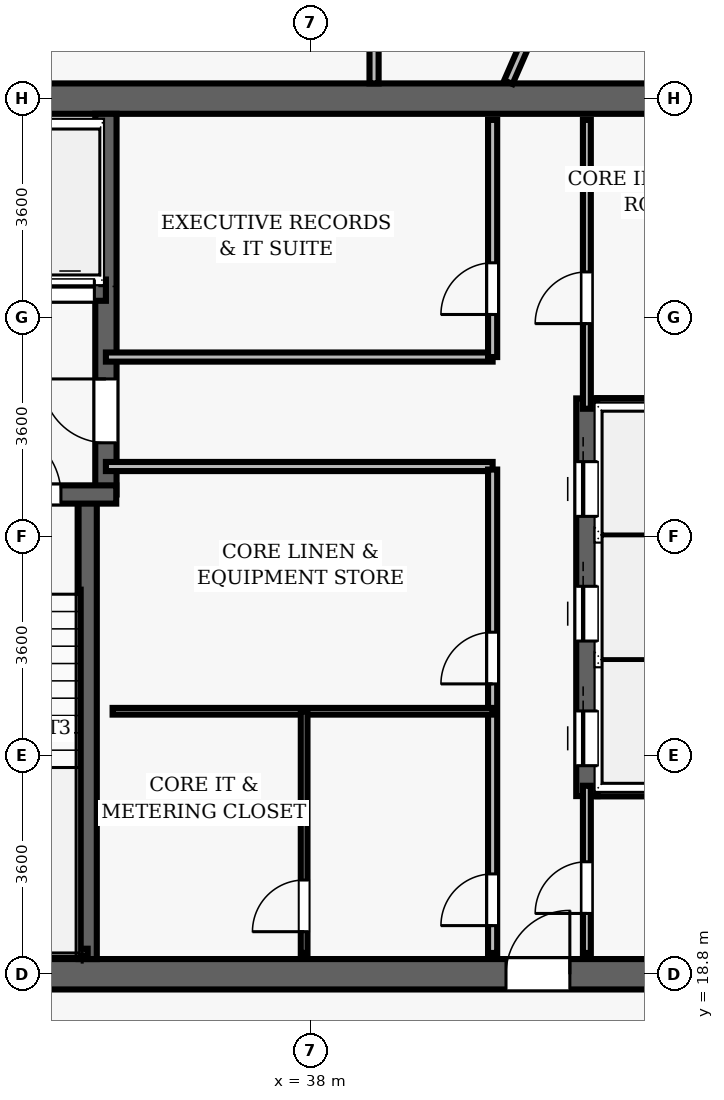
"""IFC4 building model, lengths in metres.
Left out: names, types, materials, properties, quantities, classifications, styles, units other than length and angle.
Written with IfcOpenShell. Run it as: python <this file> out.ifc"""

import sys

from ifc_helpers import new_model, si_unit, direction, frame, frame_2d, origin, place, context, subcontext, project, spatial, rectangle, extrude, element, fill, save


model = new_model("IFC4")
c1 = context("Model", 3, precision=1e-05, world=origin(), true_north=direction((0.0, 1.0)))
c2 = subcontext(c1, "Body", "Model", "MODEL_VIEW")
j1 = project(units=[si_unit("LENGTHUNIT", "METRE"), si_unit("PLANEANGLEUNIT", "RADIAN")], contexts=[c1])
p1 = place(None, origin())
s1 = spatial("IfcSite", under=j1, at=p1, CompositionType="ELEMENT")
p2 = place(p1, origin())
s2 = spatial("IfcBuilding", under=s1, at=p2, CompositionType="ELEMENT")
p3 = place(p2, frame((0.0, 0.0, 265.15)))
s3 = spatial("IfcBuildingStorey", under=s2, at=p3, CompositionType="ELEMENT", Elevation=265.15)
p4 = place(p3, frame((26.75, 18.8, 0.0), z_axis=(0.0, 0.0, 1.0), x_axis=(1.0, 0.0, 0.0)))
e1 = element("IfcWall", 1, at=p4, inside=s3, PredefinedType="SHEAR", context=c2, shape_type="SweptSolid", body=[
    extrude(rectangle(XDim=22.5, YDim=0.5, at=frame_2d((11.25, 0.0))), origin(), (0.0, 0.0, 1.0), 3.85),
])
p5 = place(p4, frame((14.47, 0.0, 0.0)))
e2 = element("IfcOpeningElement", 2, at=p5, cuts=e1, PredefinedType="OPENING", context=c2, shape_type="SweptSolid", body=[
    extrude(rectangle(XDim=1.05, YDim=2.15, at=frame_2d((0.525, 1.075))), frame((0.0, 0.26, 0.0), z_axis=(0.0, -1.0, 0.0), x_axis=(1.0, 0.0, 0.0)), (0.0, 0.0, 1.0), 0.52),
])
p6 = place(p3, frame((26.75, 33.2, 0.0), z_axis=(0.0, 0.0, 1.0), x_axis=(1.0, 0.0, 0.0)))
e3 = element("IfcWall", 3, at=p6, inside=s3, PredefinedType="SHEAR", context=c2, shape_type="SweptSolid", body=[
    extrude(rectangle(XDim=22.5, YDim=0.5, at=frame_2d((11.25, 0.0))), origin(), (0.0, 0.0, 1.0), 3.85),
])
p7 = place(p3, frame((34.34, 19.05, 0.0), z_axis=(0.0, 0.0, 1.0), x_axis=(0.0, 1.0, 0.0)))
e4 = element("IfcWall", 4, at=p7, inside=s3, PredefinedType="SHEAR", context=c2, shape_type="SweptSolid", body=[
    extrude(rectangle(XDim=7.5, YDim=0.3, at=frame_2d((3.75, 0.0))), origin(), (0.0, 0.0, 1.0), 3.85),
])
p8 = place(p3, frame((34.64, 26.69, 0.0), z_axis=(0.0, 0.0, 1.0), x_axis=(0.0, 1.0, 0.0)))
e5 = element("IfcWall", 5, at=p8, inside=s3, PredefinedType="SHEAR", context=c2, shape_type="SweptSolid", body=[
    extrude(rectangle(XDim=6.26, YDim=0.35, at=frame_2d((3.13, 0.0))), origin(), (0.0, 0.0, 1.0), 3.85),
])
p9 = place(p8, frame((0.85, 0.0, 0.0)))
e6 = element("IfcOpeningElement", 6, at=p9, cuts=e5, PredefinedType="OPENING", context=c2, shape_type="SweptSolid", body=[
    extrude(rectangle(XDim=1.05, YDim=2.15, at=frame_2d((0.525, 1.075))), frame((0.0, 0.185, 0.0), z_axis=(0.0, -1.0, 0.0), x_axis=(1.0, 0.0, 0.0)), (0.0, 0.0, 1.0), 0.37),
])
p10 = place(p3, frame((31.25, 26.69, 0.0), z_axis=(0.0, 0.0, 1.0), x_axis=(1.0, 0.0, 0.0)))
e7 = element("IfcWall", 7, at=p10, inside=s3, PredefinedType="SHEAR", context=c2, shape_type="SweptSolid", body=[
    extrude(rectangle(XDim=3.56, YDim=0.3, at=frame_2d((1.78, 0.0))), origin(), (0.0, 0.0, 1.0), 3.85),
])
p11 = place(p10, frame((1.55, 0.0, 0.0)))
e8 = element("IfcOpeningElement", 8, at=p11, cuts=e7, PredefinedType="OPENING", context=c2, shape_type="SweptSolid", body=[
    extrude(rectangle(XDim=1.1, YDim=2.15, at=frame_2d((0.55, 1.075))), frame((0.0, 0.16, 0.0), z_axis=(0.0, -1.0, 0.0), x_axis=(1.0, 0.0, 0.0)), (0.0, 0.0, 1.0), 0.32),
])
p12 = place(p3, frame((31.3, 19.16, 0.0), z_axis=(0.0, 0.0, 1.0), x_axis=(1.0, 0.0, 0.0)))
e9 = element("IfcWall", 9, at=p12, inside=s3, PredefinedType="SHEAR", context=c2, shape_type="SweptSolid", body=[
    extrude(rectangle(XDim=3.04, YDim=0.12, at=frame_2d((1.52, 0.0))), origin(), (0.0, 0.0, 1.0), 3.85),
])
p13 = place(p3, frame((32.23, 30.05, 0.0), z_axis=(0.0, 0.0, 1.0), x_axis=(1.0, 0.0, 0.0)))
e10 = element("IfcWall", 10, at=p13, inside=s3, PredefinedType="SHEAR", context=c2, shape_type="SweptSolid", body=[
    extrude(rectangle(XDim=2.41, YDim=0.35, at=frame_2d((1.205, 0.0))), origin(), (0.0, 0.0, 1.0), 3.04),
])
p14 = place(p13, frame((0.42, 0.0, 0.0)))
e11 = element("IfcOpeningElement", 11, at=p14, cuts=e10, PredefinedType="OPENING", context=c2, shape_type="SweptSolid", body=[
    extrude(rectangle(XDim=0.8, YDim=2.15, at=frame_2d((0.4, 1.075))), frame((0.0, 0.185, 0.0), z_axis=(0.0, -1.0, 0.0), x_axis=(1.0, 0.0, 0.0)), (0.0, 0.0, 1.0), 0.37),
])
p15 = place(p13, frame((1.42, 0.0, 0.0)))
e12 = element("IfcOpeningElement", 12, at=p15, cuts=e10, PredefinedType="OPENING", context=c2, shape_type="SweptSolid", body=[
    extrude(rectangle(XDim=0.8, YDim=2.15, at=frame_2d((0.4, 1.075))), frame((0.0, 0.185, 0.0), z_axis=(0.0, -1.0, 0.0), x_axis=(1.0, 0.0, 0.0)), (0.0, 0.0, 1.0), 0.37),
])
p16 = place(p3, frame((42.55, 21.73, 0.0), z_axis=(0.0, 0.0, 1.0), x_axis=(0.0, 1.0, 0.0)))
e13 = element("IfcWall", 13, at=p16, inside=s3, PredefinedType="SHEAR", context=c2, shape_type="SweptSolid", body=[
    extrude(rectangle(XDim=6.54, YDim=0.35, at=frame_2d((3.27, 0.0))), origin(), (0.0, 0.0, 1.0), 3.04),
])
p17 = place(p16, frame((0.5, 0.0, 0.0)))
e14 = element("IfcOpeningElement", 14, at=p17, cuts=e13, PredefinedType="OPENING", context=c2, shape_type="SweptSolid", body=[
    extrude(rectangle(XDim=0.9, YDim=2.15, at=frame_2d((0.45, 1.075))), frame((0.0, 0.185, 0.0), z_axis=(0.0, -1.0, 0.0), x_axis=(1.0, 0.0, 0.0)), (0.0, 0.0, 1.0), 0.37),
])
p18 = place(p16, frame((2.55, 0.0, 0.0)))
e15 = element("IfcOpeningElement", 15, at=p18, cuts=e13, PredefinedType="OPENING", context=c2, shape_type="SweptSolid", body=[
    extrude(rectangle(XDim=0.9, YDim=2.15, at=frame_2d((0.45, 1.075))), frame((0.0, 0.185, 0.0), z_axis=(0.0, -1.0, 0.0), x_axis=(1.0, 0.0, 0.0)), (0.0, 0.0, 1.0), 0.37),
])
p19 = place(p16, frame((4.6, 0.0, 0.0)))
e16 = element("IfcOpeningElement", 16, at=p19, cuts=e13, PredefinedType="OPENING", context=c2, shape_type="SweptSolid", body=[
    extrude(rectangle(XDim=0.9, YDim=2.15, at=frame_2d((0.45, 1.075))), frame((0.0, 0.185, 0.0), z_axis=(0.0, -1.0, 0.0), x_axis=(1.0, 0.0, 0.0)), (0.0, 0.0, 1.0), 0.37),
])
for number, where, z_axis, x_axis in (
    (17, (42.72, 21.9, 0.0), (0.0, 0.0, 1.0), (1.0, 0.0, 0.0)),
    (18, (42.72, 28.1, 0.0), (0.0, 0.0, 1.0), (1.0, 0.0, 0.0)),
):
    element("IfcWall", number, at=place(p3, frame(where, z_axis=z_axis, x_axis=x_axis)), inside=s3, PredefinedType="SHEAR", context=c2, shape_type="SweptSolid", body=[
        extrude(rectangle(XDim=2.03, YDim=0.35, at=frame_2d((1.015, 0.0))), origin(), (0.0, 0.0, 1.0), 3.04),
    ])
for number, where, z_axis, x_axis in (
    (19, (34.64, 27.15, 0.0), (0.0, 0.0, 1.0), (1.0, 0.0, 0.0)),
    (20, (34.64, 28.95, 0.0), (0.0, 0.0, 1.0), (1.0, 0.0, 0.0)),
):
    element("IfcWall", number, at=place(p3, frame(where, z_axis=z_axis, x_axis=x_axis)), inside=s3, PredefinedType="PARTITIONING", context=c2, shape_type="SweptSolid", body=[
        extrude(rectangle(XDim=6.36, YDim=0.15, at=frame_2d((3.18, 0.0))), origin(), (0.0, 0.0, 1.0), 3.04),
    ])
p20 = place(p3, frame((41.0, 28.95, 0.0), z_axis=(0.0, 0.0, 1.0), x_axis=(0.0, 1.0, 0.0)))
e21 = element("IfcWall", 21, at=p20, inside=s3, PredefinedType="PARTITIONING", context=c2, shape_type="SweptSolid", body=[
    extrude(rectangle(XDim=3.9, YDim=0.15, at=frame_2d((1.95, 0.0))), origin(), (0.0, 0.0, 1.0), 3.04),
])
p21 = place(p20, frame((0.7, 0.0, 0.0)))
e22 = element("IfcOpeningElement", 22, at=p21, cuts=e21, PredefinedType="OPENING", context=c2, shape_type="SweptSolid", body=[
    extrude(rectangle(XDim=0.85, YDim=2.1, at=frame_2d((0.425, 1.05))), frame((0.0, 0.085, 0.0), z_axis=(0.0, -1.0, 0.0), x_axis=(1.0, 0.0, 0.0)), (0.0, 0.0, 1.0), 0.17),
])
p22 = place(p3, frame((41.0, 19.15, 0.0), z_axis=(0.0, 0.0, 1.0), x_axis=(0.0, 1.0, 0.0)))
e23 = element("IfcWall", 23, at=p22, inside=s3, PredefinedType="PARTITIONING", context=c2, shape_type="SweptSolid", body=[
    extrude(rectangle(XDim=7.95, YDim=0.15, at=frame_2d((3.975, 0.0))), origin(), (0.0, 0.0, 1.0), 3.04),
])
p23 = place(p22, frame((4.425, 0.0, 0.0)))
e24 = element("IfcOpeningElement", 24, at=p23, cuts=e23, PredefinedType="OPENING", context=c2, shape_type="SweptSolid", body=[
    extrude(rectangle(XDim=0.85, YDim=2.1, at=frame_2d((0.425, 1.05))), frame((0.0, 0.085, 0.0), z_axis=(0.0, -1.0, 0.0), x_axis=(1.0, 0.0, 0.0)), (0.0, 0.0, 1.0), 0.17),
])
p24 = place(p22, frame((0.45, 0.0, 0.0)))
e25 = element("IfcOpeningElement", 25, at=p24, cuts=e23, PredefinedType="OPENING", context=c2, shape_type="SweptSolid", body=[
    extrude(rectangle(XDim=0.85, YDim=2.1, at=frame_2d((0.425, 1.05))), frame((0.0, 0.085, 0.0), z_axis=(0.0, -1.0, 0.0), x_axis=(1.0, 0.0, 0.0)), (0.0, 0.0, 1.0), 0.17),
])
p25 = place(p3, frame((34.75, 23.125, 0.0), z_axis=(0.0, 0.0, 1.0), x_axis=(1.0, 0.0, 0.0)))
e26 = element("IfcWall", 26, at=p25, inside=s3, PredefinedType="PARTITIONING", context=c2, shape_type="SweptSolid", body=[
    extrude(rectangle(XDim=6.25, YDim=0.11, at=frame_2d((3.125, 0.0))), origin(), (0.0, 0.0, 1.0), 3.04),
])
p26 = place(p3, frame((37.9, 19.15, 0.0), z_axis=(0.0, 0.0, 1.0), x_axis=(0.0, 1.0, 0.0)))
e27 = element("IfcWall", 27, at=p26, inside=s3, PredefinedType="PARTITIONING", context=c2, shape_type="SweptSolid", body=[
    extrude(rectangle(XDim=3.975, YDim=0.11, at=frame_2d((1.988, 0.0))), origin(), (0.0, 0.0, 1.0), 3.04),
])
p27 = place(p26, frame((0.35, 0.0, 0.0)))
e28 = element("IfcOpeningElement", 28, at=p27, cuts=e27, PredefinedType="OPENING", context=c2, shape_type="SweptSolid", body=[
    extrude(rectangle(XDim=0.85, YDim=2.1, at=frame_2d((0.425, 1.05))), frame((0.0, 0.065, 0.0), z_axis=(0.0, -1.0, 0.0), x_axis=(1.0, 0.0, 0.0)), (0.0, 0.0, 1.0), 0.13),
])
p28 = place(p3, frame((42.55, 28.1, 0.0), z_axis=(0.0, 0.0, 1.0), x_axis=(0.0, 1.0, 0.0)))
e29 = element("IfcWall", 29, at=p28, inside=s3, PredefinedType="PARTITIONING", context=c2, shape_type="SweptSolid", body=[
    extrude(rectangle(XDim=4.75, YDim=0.13, at=frame_2d((2.375, 0.0))), origin(), (0.0, 0.0, 1.0), 3.04),
])
p29 = place(p28, frame((1.4, 0.0, 0.0)))
e30 = element("IfcOpeningElement", 30, at=p29, cuts=e29, PredefinedType="OPENING", context=c2, shape_type="SweptSolid", body=[
    extrude(rectangle(XDim=0.85, YDim=2.1, at=frame_2d((0.425, 1.05))), frame((0.0, 0.075, 0.0), z_axis=(0.0, -1.0, 0.0), x_axis=(1.0, 0.0, 0.0)), (0.0, 0.0, 1.0), 0.15),
])
p30 = place(p3, frame((42.55, 19.15, 0.0), z_axis=(0.0, 0.0, 1.0), x_axis=(0.0, 1.0, 0.0)))
e31 = element("IfcWall", 31, at=p30, inside=s3, PredefinedType="PARTITIONING", context=c2, shape_type="SweptSolid", body=[
    extrude(rectangle(XDim=2.75, YDim=0.13, at=frame_2d((1.375, 0.0))), origin(), (0.0, 0.0, 1.0), 3.04),
])
p31 = place(p30, frame((0.65, 0.0, 0.0)))
e32 = element("IfcOpeningElement", 32, at=p31, cuts=e31, PredefinedType="OPENING", context=c2, shape_type="SweptSolid", body=[
    extrude(rectangle(XDim=0.85, YDim=2.1, at=frame_2d((0.425, 1.05))), frame((0.0, 0.075, 0.0), z_axis=(0.0, -1.0, 0.0), x_axis=(1.0, 0.0, 0.0)), (0.0, 0.0, 1.0), 0.15),
])
p32 = place(p3, frame((39.05, 33.45, 0.0), z_axis=(0.0, 0.0, 1.0), x_axis=(0.0, 1.0, 0.0)))
e33 = element("IfcWall", 33, at=p32, inside=s3, PredefinedType="PARTITIONING", context=c2, shape_type="SweptSolid", body=[
    extrude(rectangle(XDim=6.95, YDim=0.15, at=frame_2d((3.475, 0.0))), origin(), (0.0, 0.0, 1.0), 3.04),
])
p33 = place(p32, frame((0.988, 0.0, 0.0)))
e34 = element("IfcOpeningElement", 34, at=p33, cuts=e33, PredefinedType="OPENING", context=c2, shape_type="SweptSolid", body=[
    extrude(rectangle(XDim=1.5, YDim=2.2, at=frame_2d((0.75, 1.1))), frame((0.0, 0.085, 0.0), z_axis=(0.0, -1.0, 0.0), x_axis=(1.0, 0.0, 0.0)), (0.0, 0.0, 1.0), 0.17),
])
p34 = place(p3, frame((41.259, 33.47, 0.0), z_axis=(0.0, 0.0, 1.0), x_axis=(0.399905988598, 0.916556163191, 0.0)))
e35 = element("IfcWall", 35, at=p34, inside=s3, PredefinedType="PARTITIONING", context=c2, shape_type="SweptSolid", body=[
    extrude(rectangle(XDim=12.602, YDim=0.15, at=frame_2d((6.301, 0.0))), origin(), (0.0, 0.0, 1.0), 3.04),
])
p35 = place(p11, origin())
e36 = element("IfcDoor", 36, at=p35, inside=s3, OperationType="SINGLE_SWING_LEFT", PredefinedType="DOOR", context=c2, shape_type="SweptSolid", body=[
    extrude(rectangle(XDim=1.1, YDim=2.15, at=frame_2d((0.55, 1.075))), frame((0.0, 0.025, 0.0), z_axis=(0.0, -1.0, 0.0), x_axis=(1.0, 0.0, 0.0)), (0.0, 0.0, 1.0), 0.05),
])
fill(e8, e36)
p36 = place(p5, origin())
e37 = element("IfcDoor", 37, at=p36, inside=s3, OperationType="SINGLE_SWING_RIGHT", PredefinedType="DOOR", context=c2, shape_type="SweptSolid", body=[
    extrude(rectangle(XDim=1.05, YDim=2.15, at=frame_2d((0.525, 1.075))), frame((0.0, 0.025, 0.0), z_axis=(0.0, -1.0, 0.0), x_axis=(1.0, 0.0, 0.0)), (0.0, 0.0, 1.0), 0.05),
])
fill(e2, e37)
p37 = place(p9, origin())
e38 = element("IfcDoor", 38, at=p37, inside=s3, OperationType="SINGLE_SWING_RIGHT", PredefinedType="DOOR", context=c2, shape_type="SweptSolid", body=[
    extrude(rectangle(XDim=1.05, YDim=2.15, at=frame_2d((0.525, 1.075))), frame((0.0, 0.025, 0.0), z_axis=(0.0, -1.0, 0.0), x_axis=(1.0, 0.0, 0.0)), (0.0, 0.0, 1.0), 0.05),
])
fill(e6, e38)
p38 = place(p21, origin())
e39 = element("IfcDoor", 39, at=p38, inside=s3, OperationType="SINGLE_SWING_LEFT", PredefinedType="DOOR", context=c2, shape_type="SweptSolid", body=[
    extrude(rectangle(XDim=0.85, YDim=2.1, at=frame_2d((0.425, 1.05))), frame((0.0, 0.025, 0.0), z_axis=(0.0, -1.0, 0.0), x_axis=(1.0, 0.0, 0.0)), (0.0, 0.0, 1.0), 0.05),
])
fill(e22, e39)
p39 = place(p23, origin())
e40 = element("IfcDoor", 40, at=p39, inside=s3, OperationType="SINGLE_SWING_LEFT", PredefinedType="DOOR", context=c2, shape_type="SweptSolid", body=[
    extrude(rectangle(XDim=0.85, YDim=2.1, at=frame_2d((0.425, 1.05))), frame((0.0, 0.025, 0.0), z_axis=(0.0, -1.0, 0.0), x_axis=(1.0, 0.0, 0.0)), (0.0, 0.0, 1.0), 0.05),
])
fill(e24, e40)
p40 = place(p24, origin())
e41 = element("IfcDoor", 41, at=p40, inside=s3, OperationType="SINGLE_SWING_LEFT", PredefinedType="DOOR", context=c2, shape_type="SweptSolid", body=[
    extrude(rectangle(XDim=0.85, YDim=2.1, at=frame_2d((0.425, 1.05))), frame((0.0, 0.025, 0.0), z_axis=(0.0, -1.0, 0.0), x_axis=(1.0, 0.0, 0.0)), (0.0, 0.0, 1.0), 0.05),
])
fill(e25, e41)
p41 = place(p27, origin())
e42 = element("IfcDoor", 42, at=p41, inside=s3, OperationType="SINGLE_SWING_LEFT", PredefinedType="DOOR", context=c2, shape_type="SweptSolid", body=[
    extrude(rectangle(XDim=0.85, YDim=2.1, at=frame_2d((0.425, 1.05))), frame((0.0, 0.025, 0.0), z_axis=(0.0, -1.0, 0.0), x_axis=(1.0, 0.0, 0.0)), (0.0, 0.0, 1.0), 0.05),
])
fill(e28, e42)
p42 = place(p29, origin())
e43 = element("IfcDoor", 43, at=p42, inside=s3, OperationType="SINGLE_SWING_LEFT", PredefinedType="DOOR", context=c2, shape_type="SweptSolid", body=[
    extrude(rectangle(XDim=0.85, YDim=2.1, at=frame_2d((0.425, 1.05))), frame((0.0, 0.025, 0.0), z_axis=(0.0, -1.0, 0.0), x_axis=(1.0, 0.0, 0.0)), (0.0, 0.0, 1.0), 0.05),
])
fill(e30, e43)
p43 = place(p31, origin())
e44 = element("IfcDoor", 44, at=p43, inside=s3, OperationType="SINGLE_SWING_LEFT", PredefinedType="DOOR", context=c2, shape_type="SweptSolid", body=[
    extrude(rectangle(XDim=0.85, YDim=2.1, at=frame_2d((0.425, 1.05))), frame((0.0, 0.025, 0.0), z_axis=(0.0, -1.0, 0.0), x_axis=(1.0, 0.0, 0.0)), (0.0, 0.0, 1.0), 0.05),
])
fill(e32, e44)
p44 = place(p17, origin())
e45 = element("IfcDoor", 45, at=p44, inside=s3, OperationType="SLIDING_TO_LEFT", PredefinedType="DOOR", context=c2, shape_type="SweptSolid", body=[
    extrude(rectangle(XDim=0.9, YDim=2.15, at=frame_2d((0.45, 1.075))), frame((0.0, 0.025, 0.0), z_axis=(0.0, -1.0, 0.0), x_axis=(1.0, 0.0, 0.0)), (0.0, 0.0, 1.0), 0.05),
])
fill(e14, e45)
p45 = place(p18, origin())
e46 = element("IfcDoor", 46, at=p45, inside=s3, OperationType="SLIDING_TO_LEFT", PredefinedType="DOOR", context=c2, shape_type="SweptSolid", body=[
    extrude(rectangle(XDim=0.9, YDim=2.15, at=frame_2d((0.45, 1.075))), frame((0.0, 0.025, 0.0), z_axis=(0.0, -1.0, 0.0), x_axis=(1.0, 0.0, 0.0)), (0.0, 0.0, 1.0), 0.05),
])
fill(e15, e46)
p46 = place(p19, origin())
e47 = element("IfcDoor", 47, at=p46, inside=s3, OperationType="SLIDING_TO_LEFT", PredefinedType="DOOR", context=c2, shape_type="SweptSolid", body=[
    extrude(rectangle(XDim=0.9, YDim=2.15, at=frame_2d((0.45, 1.075))), frame((0.0, 0.025, 0.0), z_axis=(0.0, -1.0, 0.0), x_axis=(1.0, 0.0, 0.0)), (0.0, 0.0, 1.0), 0.05),
])
fill(e16, e47)
p47 = place(p15, origin())
e48 = element("IfcDoor", 48, at=p47, inside=s3, OperationType="SLIDING_TO_LEFT", PredefinedType="DOOR", context=c2, shape_type="SweptSolid", body=[
    extrude(rectangle(XDim=0.8, YDim=2.15, at=frame_2d((0.4, 1.075))), frame((0.0, 0.025, 0.0), z_axis=(0.0, -1.0, 0.0), x_axis=(1.0, 0.0, 0.0)), (0.0, 0.0, 1.0), 0.05),
])
fill(e12, e48)
save(model, sys.argv[1])
